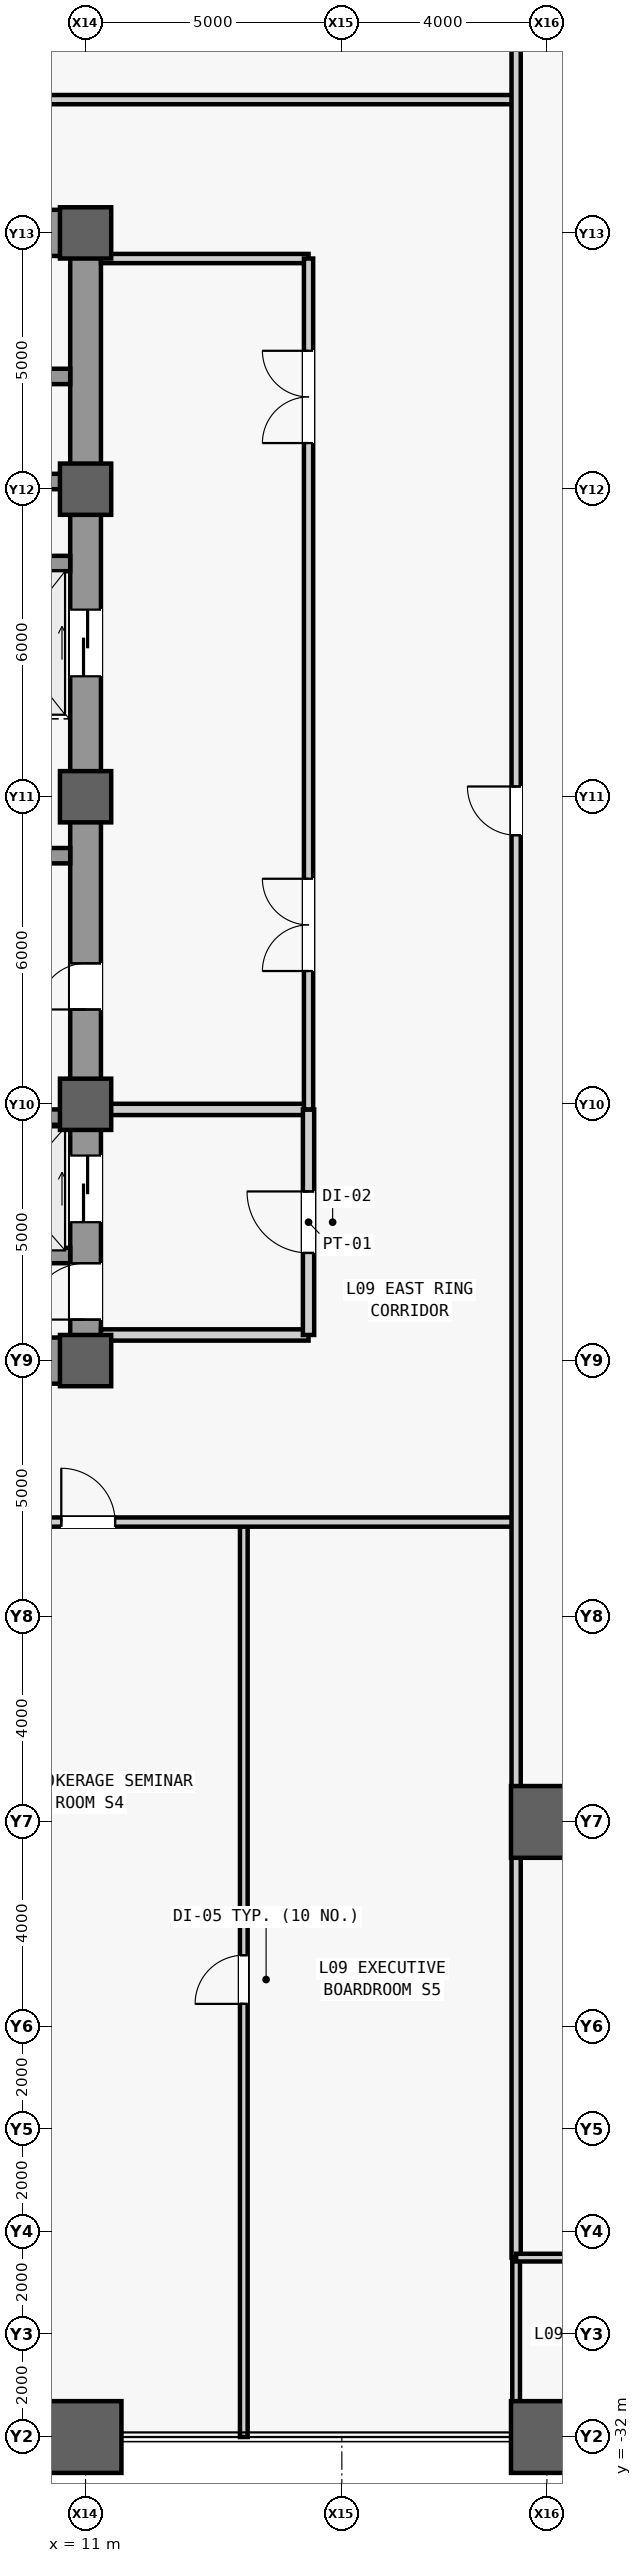
"""IFC4 building model, lengths in metres.
Left out: names, types, materials, properties, quantities, classifications, styles, units other than length and angle.
Written with IfcOpenShell. Run it as: python <this file> out.ifc"""

import sys

from ifc_helpers import new_model, si_unit, direction, frame, frame_2d, origin, origin_2d, place, context, subcontext, project, spatial, rectangle, hollow_rectangle, extrude, source, transform, mapped, element, fill, save


model = new_model("IFC4")
c1 = context("Model", 3, precision=1e-05, world=origin(), true_north=direction((0.0, 1.0)))
c2 = subcontext(c1, "Body", "Model", "MODEL_VIEW")
j1 = project(units=[si_unit("LENGTHUNIT", "METRE"), si_unit("PLANEANGLEUNIT", "RADIAN")], contexts=[c1])
p1 = place(None, origin())
s1 = spatial("IfcSite", under=j1, at=p1, CompositionType="ELEMENT")
p2 = place(p1, origin())
s2 = spatial("IfcBuilding", under=s1, at=p2, CompositionType="ELEMENT")
p3 = place(p2, frame((0.0, 0.0, 45.2)))
s3 = spatial("IfcBuildingStorey", under=s2, at=p3, CompositionType="ELEMENT", Elevation=45.2)
m1 = source(origin(), c2, "Body", "SweptSolid", [
    extrude(rectangle(XDim=22.0, YDim=0.6, at=frame_2d((11.0, 0.0))), origin(), (0.0, 0.0, 1.0), 3.94),
])
p4 = place(p3, frame((11.0, -11.0, 0.0), z_axis=(0.0, 0.0, 1.0), x_axis=(0.0, 1.0, 0.0)))
e1 = element("IfcWall", 1, at=p4, inside=s3, PredefinedType="SHEAR", context=c2, shape_type="MappedRepresentation", body=[
    mapped(m1, transform((0.0, 0.0, 0.0), scale=1.0)),
])
m2 = source(origin(), c2, "Body", "SweptSolid", [
    extrude(rectangle(XDim=1.1, YDim=2.2, at=frame_2d((0.55, 1.1))), frame((0.0, 0.31, 0.0), z_axis=(0.0, -1.0, 0.0), x_axis=(1.0, 0.0, 0.0)), (0.0, 0.0, 1.0), 0.62),
])
p5 = place(p4, frame((0.8, 0.0, 0.0)))
e2 = element("IfcOpeningElement", 2, at=p5, cuts=e1, PredefinedType="OPENING", context=c2, shape_type="MappedRepresentation", body=[
    mapped(m2, transform((0.0, 0.0, 0.0), scale=1.0)),
])
m3 = source(origin(), c2, "Body", "SweptSolid", [
    extrude(rectangle(XDim=0.9, YDim=2.15, at=frame_2d((0.45, 1.075))), frame((0.0, 0.31, 0.0), z_axis=(0.0, -1.0, 0.0), x_axis=(1.0, 0.0, 0.0)), (0.0, 0.0, 1.0), 0.62),
])
p6 = place(p4, frame((6.85, 0.0, 0.0)))
e3 = element("IfcOpeningElement", 3, at=p6, cuts=e1, PredefinedType="OPENING", context=c2, shape_type="MappedRepresentation", body=[
    mapped(m3, transform((0.0, 0.0, 0.0), scale=1.0)),
])
m4 = source(origin(), c2, "Body", "SweptSolid", [
    extrude(rectangle(XDim=1.3, YDim=2.3, at=frame_2d((0.65, 1.15))), frame((0.0, 0.31, 0.0), z_axis=(0.0, -1.0, 0.0), x_axis=(1.0, 0.0, 0.0)), (0.0, 0.0, 1.0), 0.62),
])
p7 = place(p4, frame((2.7, 0.0, 0.0)))
e4 = element("IfcOpeningElement", 4, at=p7, cuts=e1, PredefinedType="OPENING", context=c2, shape_type="MappedRepresentation", body=[
    mapped(m4, transform((0.0, 0.0, 0.0), scale=1.0)),
])
p8 = place(p4, frame((13.35, 0.0, 0.0)))
e5 = element("IfcOpeningElement", 5, at=p8, cuts=e1, PredefinedType="OPENING", context=c2, shape_type="MappedRepresentation", body=[
    mapped(m4, transform((0.0, 0.0, 0.0), scale=1.0)),
])
m5 = source(origin(), c2, "Body", "SweptSolid", [
    extrude(rectangle(XDim=5.85, YDim=0.9, at=frame_2d((2.925, 0.0))), origin(), (0.0, 0.0, 1.0), 3.94),
])
p9 = place(p3, frame((4.85, -11.0, 0.0), z_axis=(0.0, 0.0, 1.0), x_axis=(1.0, 0.0, 0.0)))
e6 = element("IfcWall", 6, at=p9, inside=s3, PredefinedType="SHEAR", context=c2, shape_type="MappedRepresentation", body=[
    mapped(m5, transform((0.0, 0.0, 0.0), scale=1.0)),
])
p10 = place(p3, frame((4.85, 11.0, 0.0), z_axis=(0.0, 0.0, 1.0), x_axis=(1.0, 0.0, 0.0)))
e7 = element("IfcWall", 7, at=p10, inside=s3, PredefinedType="SHEAR", context=c2, shape_type="MappedRepresentation", body=[
    mapped(m5, transform((0.0, 0.0, 0.0), scale=1.0)),
])
m6 = source(origin(), c2, "Body", "SweptSolid", [
    extrude(rectangle(XDim=1.05, YDim=2.2, at=frame_2d((0.525, 1.1))), frame((0.0, 0.46, 0.0), z_axis=(0.0, -1.0, 0.0), x_axis=(1.0, 0.0, 0.0)), (0.0, 0.0, 1.0), 0.92),
])
p11 = place(p10, frame((1.375, 0.0, 0.0)))
e8 = element("IfcOpeningElement", 8, at=p11, cuts=e7, PredefinedType="OPENING", context=c2, shape_type="MappedRepresentation", body=[
    mapped(m6, transform((0.0, 0.0, 0.0), scale=1.0)),
])
m7 = source(origin(), c2, "Body", "SweptSolid", [
    extrude(rectangle(XDim=5.6, YDim=0.3, at=frame_2d((2.8, 0.0))), origin(), (0.0, 0.0, 1.0), 3.94),
])
p12 = place(p3, frame((5.1, -1.15, 0.0), z_axis=(0.0, 0.0, 1.0), x_axis=(1.0, 0.0, 0.0)))
e9 = element("IfcWall", 9, at=p12, inside=s3, PredefinedType="SHEAR", context=c2, shape_type="MappedRepresentation", body=[
    mapped(m7, transform((0.0, 0.0, 0.0), scale=1.0)),
])
m8 = source(origin(), c2, "Body", "SweptSolid", [
    extrude(hollow_rectangle(XDim=1.4, YDim=1.4, WallThickness=0.075, at=origin_2d()), origin(), (0.0, 0.0, 1.0), 4.2),
])
p13 = place(p3, frame((11.0, -32.0, 0.0), z_axis=(0.0, 0.0, 1.0), x_axis=(1.0, 0.0, 0.0)))
e10 = element("IfcColumn", 10, at=p13, inside=s3, PredefinedType="COLUMN", context=c2, shape_type="MappedRepresentation", body=[
    mapped(m8, transform((0.0, 0.0, 0.0), scale=1.0)),
])
m9 = source(origin(), c2, "Body", "SweptSolid", [
    extrude(rectangle(XDim=1.0, YDim=1.0, at=origin_2d()), origin(), (0.0, 0.0, 1.0), 4.2),
])
for number, where, z_axis, x_axis in (
    (11, (11.0, -11.0, 0.0), (0.0, 0.0, 1.0), (1.0, 0.0, 0.0)),
    (12, (11.0, -6.0, 0.0), (0.0, 0.0, 1.0), (1.0, 0.0, 0.0)),
    (13, (11.0, 0.0, 0.0), (0.0, 0.0, 1.0), (1.0, 0.0, 0.0)),
    (14, (11.0, 6.0, 0.0), (0.0, 0.0, 1.0), (1.0, 0.0, 0.0)),
    (15, (11.0, 11.0, 0.0), (0.0, 0.0, 1.0), (1.0, 0.0, 0.0)),
):
    element("IfcColumn", number, at=place(p3, frame(where, z_axis=z_axis, x_axis=x_axis)), inside=s3, PredefinedType="COLUMN", context=c2, shape_type="MappedRepresentation", body=[
        mapped(m9, transform((0.0, 0.0, 0.0), scale=1.0)),
    ])
for number, where, z_axis, x_axis in (
    (16, (20.0, -32.0, 0.0), (0.0, 0.0, 1.0), (1.0, 0.0, 0.0)),
    (17, (20.0, -20.0, 0.0), (0.0, 0.0, 1.0), (1.0, 0.0, 0.0)),
):
    element("IfcColumn", number, at=place(p3, frame(where, z_axis=z_axis, x_axis=x_axis)), inside=s3, PredefinedType="COLUMN", context=c2, shape_type="MappedRepresentation", body=[
        mapped(m8, transform((0.0, 0.0, 0.0), scale=1.0)),
    ])
m10 = source(origin(), c2, "Body", "SweptSolid", [
    extrude(rectangle(XDim=2.2, YDim=0.3, at=frame_2d((1.1, 0.0))), origin(), (0.0, 0.0, 1.0), 3.94),
])
for number, where, z_axis, x_axis in (
    (18, (8.5, -8.95, 0.0), (0.0, 0.0, 1.0), (1.0, 0.0, 0.0)),
    (19, (8.5, -6.25, 0.0), (0.0, 0.0, 1.0), (1.0, 0.0, 0.0)),
):
    element("IfcWall", number, at=place(p3, frame(where, z_axis=z_axis, x_axis=x_axis)), inside=s3, PredefinedType="SHEAR", context=c2, shape_type="MappedRepresentation", body=[
        mapped(m10, transform((0.0, 0.0, 0.0), scale=1.0)),
    ])
m11 = source(origin(), c2, "Body", "SweptSolid", [
    extrude(rectangle(XDim=2.3, YDim=0.3, at=frame_2d((1.15, 0.0))), origin(), (0.0, 0.0, 1.0), 3.94),
])
for number, where, z_axis, x_axis in (
    (20, (8.4, 4.55, 0.0), (0.0, 0.0, 1.0), (1.0, 0.0, 0.0)),
    (21, (8.4, 6.15, 0.0), (0.0, 0.0, 1.0), (1.0, 0.0, 0.0)),
    (22, (8.4, 8.2, 0.0), (0.0, 0.0, 1.0), (1.0, 0.0, 0.0)),
):
    element("IfcWall", number, at=place(p3, frame(where, z_axis=z_axis, x_axis=x_axis)), inside=s3, PredefinedType="SHEAR", context=c2, shape_type="MappedRepresentation", body=[
        mapped(m11, transform((0.0, 0.0, 0.0), scale=1.0)),
    ])
m12 = source(origin(), c2, "Body", "SweptSolid", [
    extrude(rectangle(XDim=4.05, YDim=0.22, at=frame_2d((2.025, 0.0))), origin(), (0.0, 0.0, 1.0), 3.94),
])
p14 = place(p3, frame((11.3, -10.5, 0.0), z_axis=(0.0, 0.0, 1.0), x_axis=(1.0, 0.0, 0.0)))
e23 = element("IfcWall", 23, at=p14, inside=s3, PredefinedType="PARTITIONING", context=c2, shape_type="MappedRepresentation", body=[
    mapped(m12, transform((0.0, 0.0, 0.0), scale=1.0)),
])
m13 = source(origin(), c2, "Body", "SweptSolid", [
    extrude(rectangle(XDim=4.05, YDim=0.22, at=frame_2d((2.025, 0.0))), origin(), (0.0, 0.0, 1.0), 3.085),
])
p15 = place(p3, frame((11.3, -6.1, 0.0), z_axis=(0.0, 0.0, 1.0), x_axis=(1.0, 0.0, 0.0)))
e24 = element("IfcWall", 24, at=p15, inside=s3, PredefinedType="PARTITIONING", context=c2, shape_type="MappedRepresentation", body=[
    mapped(m13, transform((0.0, 0.0, 0.0), scale=1.0)),
])
m14 = source(origin(), c2, "Body", "SweptSolid", [
    extrude(rectangle(XDim=4.4, YDim=0.22, at=frame_2d((2.2, 0.0))), origin(), (0.0, 0.0, 1.0), 3.94),
])
p16 = place(p3, frame((15.35, -10.5, 0.0), z_axis=(0.0, 0.0, 1.0), x_axis=(0.0, 1.0, 0.0)))
e25 = element("IfcWall", 25, at=p16, inside=s3, PredefinedType="PARTITIONING", context=c2, shape_type="MappedRepresentation", body=[
    mapped(m14, transform((0.0, 0.0, 0.0), scale=1.0)),
])
m15 = source(origin(), c2, "Body", "SweptSolid", [
    extrude(rectangle(XDim=1.2, YDim=2.2, at=frame_2d((0.6, 1.1))), frame((0.0, 0.12, 0.0), z_axis=(0.0, -1.0, 0.0), x_axis=(1.0, 0.0, 0.0)), (0.0, 0.0, 1.0), 0.24),
])
p17 = place(p16, frame((1.6, 0.0, 0.0)))
e26 = element("IfcOpeningElement", 26, at=p17, cuts=e25, PredefinedType="OPENING", context=c2, shape_type="MappedRepresentation", body=[
    mapped(m15, transform((0.0, 0.0, 0.0), scale=1.0)),
])
m16 = source(origin(), c2, "Body", "SweptSolid", [
    extrude(rectangle(XDim=4.05, YDim=0.18, at=frame_2d((2.025, 0.0))), origin(), (0.0, 0.0, 1.0), 3.94),
])
p18 = place(p3, frame((11.3, 10.5, 0.0), z_axis=(0.0, 0.0, 1.0), x_axis=(1.0, 0.0, 0.0)))
e27 = element("IfcWall", 27, at=p18, inside=s3, PredefinedType="PARTITIONING", context=c2, shape_type="MappedRepresentation", body=[
    mapped(m16, transform((0.0, 0.0, 0.0), scale=1.0)),
])
m17 = source(origin(), c2, "Body", "SweptSolid", [
    extrude(rectangle(XDim=16.6, YDim=0.18, at=frame_2d((8.3, 0.0))), origin(), (0.0, 0.0, 1.0), 3.94),
])
p19 = place(p3, frame((15.35, -6.1, 0.0), z_axis=(0.0, 0.0, 1.0), x_axis=(0.0, 1.0, 0.0)))
e28 = element("IfcWall", 28, at=p19, inside=s3, PredefinedType="PARTITIONING", context=c2, shape_type="MappedRepresentation", body=[
    mapped(m17, transform((0.0, 0.0, 0.0), scale=1.0)),
])
m18 = source(origin(), c2, "Body", "SweptSolid", [
    extrude(rectangle(XDim=1.8, YDim=2.25, at=frame_2d((0.9, 1.125))), frame((0.0, 0.1, 0.0), z_axis=(0.0, -1.0, 0.0), x_axis=(1.0, 0.0, 0.0)), (0.0, 0.0, 1.0), 0.2),
])
p20 = place(p19, frame((2.7, 0.0, 0.0)))
e29 = element("IfcOpeningElement", 29, at=p20, cuts=e28, PredefinedType="OPENING", context=c2, shape_type="MappedRepresentation", body=[
    mapped(m18, transform((0.0, 0.0, 0.0), scale=1.0)),
])
p21 = place(p19, frame((13.0, 0.0, 0.0)))
e30 = element("IfcOpeningElement", 30, at=p21, cuts=e28, PredefinedType="OPENING", context=c2, shape_type="MappedRepresentation", body=[
    mapped(m18, transform((0.0, 0.0, 0.0), scale=1.0)),
])
m19 = source(origin(), c2, "Body", "SweptSolid", [
    extrude(rectangle(XDim=17.85, YDim=0.15, at=frame_2d((8.925, 0.0))), origin(), (0.0, 0.0, 1.0), 3.94),
])
p22 = place(p3, frame((14.087, -32.0, 0.0), z_axis=(0.0, 0.0, 1.0), x_axis=(0.0, 1.0, 0.0)))
e31 = element("IfcWall", 31, at=p22, inside=s3, PredefinedType="PARTITIONING", context=c2, shape_type="MappedRepresentation", body=[
    mapped(m19, transform((0.0, 0.0, 0.0), scale=1.0)),
])
m20 = source(origin(), c2, "Body", "SweptSolid", [
    extrude(rectangle(XDim=0.95, YDim=2.15, at=frame_2d((0.475, 1.075))), frame((0.0, 0.085, 0.0), z_axis=(0.0, -1.0, 0.0), x_axis=(1.0, 0.0, 0.0)), (0.0, 0.0, 1.0), 0.17),
])
p23 = place(p22, frame((8.45, 0.0, 0.0)))
e32 = element("IfcOpeningElement", 32, at=p23, cuts=e31, PredefinedType="OPENING", context=c2, shape_type="MappedRepresentation", body=[
    mapped(m20, transform((0.0, 0.0, 0.0), scale=1.0)),
])
m21 = source(origin(), c2, "Body", "SweptSolid", [
    extrude(rectangle(XDim=37.95, YDim=0.18, at=frame_2d((18.975, 0.0))), origin(), (0.0, 0.0, 1.0), 3.94),
])
p24 = place(p3, frame((-18.55, -14.15, 0.0), z_axis=(0.0, 0.0, 1.0), x_axis=(1.0, 0.0, 0.0)))
e33 = element("IfcWall", 33, at=p24, inside=s3, PredefinedType="PARTITIONING", context=c2, shape_type="MappedRepresentation", body=[
    mapped(m21, transform((0.0, 0.0, 0.0), scale=1.0)),
])
m22 = source(origin(), c2, "Body", "SweptSolid", [
    extrude(rectangle(XDim=1.05, YDim=2.2, at=frame_2d((0.525, 1.1))), frame((0.0, 0.1, 0.0), z_axis=(0.0, -1.0, 0.0), x_axis=(1.0, 0.0, 0.0)), (0.0, 0.0, 1.0), 0.2),
])
p25 = place(p24, frame((5.345, 0.0, 0.0)))
e34 = element("IfcOpeningElement", 34, at=p25, cuts=e33, PredefinedType="OPENING", context=c2, shape_type="MappedRepresentation", body=[
    mapped(m22, transform((0.0, 0.0, 0.0), scale=1.0)),
])
p26 = place(p24, frame((11.809, 0.0, 0.0)))
e35 = element("IfcOpeningElement", 35, at=p26, cuts=e33, PredefinedType="OPENING", context=c2, shape_type="MappedRepresentation", body=[
    mapped(m22, transform((0.0, 0.0, 0.0), scale=1.0)),
])
p27 = place(p24, frame((21.296, 0.0, 0.0)))
e36 = element("IfcOpeningElement", 36, at=p27, cuts=e33, PredefinedType="OPENING", context=c2, shape_type="MappedRepresentation", body=[
    mapped(m22, transform((0.0, 0.0, 0.0), scale=1.0)),
])
p28 = place(p24, frame((29.076, 0.0, 0.0)))
e37 = element("IfcOpeningElement", 37, at=p28, cuts=e33, PredefinedType="OPENING", context=c2, shape_type="MappedRepresentation", body=[
    mapped(m22, transform((0.0, 0.0, 0.0), scale=1.0)),
])
p29 = place(p3, frame((-18.55, 13.6, 0.0), z_axis=(0.0, 0.0, 1.0), x_axis=(1.0, 0.0, 0.0)))
e38 = element("IfcWall", 38, at=p29, inside=s3, PredefinedType="PARTITIONING", context=c2, shape_type="MappedRepresentation", body=[
    mapped(m21, transform((0.0, 0.0, 0.0), scale=1.0)),
])
p30 = place(p29, frame((18.025, 0.0, 0.0)))
e39 = element("IfcOpeningElement", 39, at=p30, cuts=e38, PredefinedType="OPENING", context=c2, shape_type="MappedRepresentation", body=[
    mapped(m22, transform((0.0, 0.0, 0.0), scale=1.0)),
])
m23 = source(origin(), c2, "Body", "SweptSolid", [
    extrude(rectangle(XDim=3.5, YDim=0.15, at=frame_2d((1.75, 0.0))), origin(), (0.0, 0.0, 1.0), 3.94),
])
p31 = place(p3, frame((19.4, -32.0, 0.0), z_axis=(0.0, 0.0, 1.0), x_axis=(0.0, 1.0, 0.0)))
e40 = element("IfcWall", 40, at=p31, inside=s3, PredefinedType="PARTITIONING", context=c2, shape_type="MappedRepresentation", body=[
    mapped(m23, transform((0.0, 0.0, 0.0), scale=1.0)),
])
m24 = source(origin(), c2, "Body", "SweptSolid", [
    extrude(rectangle(XDim=57.0, YDim=0.18, at=frame_2d((28.5, 0.0))), origin(), (0.0, 0.0, 1.0), 3.471),
])
p32 = place(p3, frame((19.4, -28.5, 0.0), z_axis=(0.0, 0.0, 1.0), x_axis=(0.0, 1.0, 0.0)))
e41 = element("IfcWall", 41, at=p32, inside=s3, PredefinedType="PARTITIONING", context=c2, shape_type="MappedRepresentation", body=[
    mapped(m24, transform((0.0, 0.0, 0.0), scale=1.0)),
])
m25 = source(origin(), c2, "Body", "SweptSolid", [
    extrude(rectangle(XDim=0.95, YDim=2.15, at=frame_2d((0.475, 1.075))), frame((0.0, 0.1, 0.0), z_axis=(0.0, -1.0, 0.0), x_axis=(1.0, 0.0, 0.0)), (0.0, 0.0, 1.0), 0.2),
])
p33 = place(p32, frame((27.75, 0.0, 0.0)))
e42 = element("IfcOpeningElement", 42, at=p33, cuts=e41, PredefinedType="OPENING", context=c2, shape_type="MappedRepresentation", body=[
    mapped(m25, transform((0.0, 0.0, 0.0), scale=1.0)),
])
m26 = source(origin(), c2, "Body", "SweptSolid", [
    extrude(rectangle(XDim=9.1, YDim=0.15, at=frame_2d((4.55, 0.0))), origin(), (0.0, 0.0, 1.0), 3.94),
])
p34 = place(p3, frame((19.4, -28.5, 0.0), z_axis=(0.0, 0.0, 1.0), x_axis=(1.0, 0.0, 0.0)))
e43 = element("IfcWall", 43, at=p34, inside=s3, PredefinedType="PARTITIONING", context=c2, shape_type="MappedRepresentation", body=[
    mapped(m26, transform((0.0, 0.0, 0.0), scale=1.0)),
])
p35 = place(p34, frame((4.075, 0.0, 0.0)))
e44 = element("IfcOpeningElement", 44, at=p35, cuts=e43, PredefinedType="OPENING", context=c2, shape_type="MappedRepresentation", body=[
    mapped(m20, transform((0.0, 0.0, 0.0), scale=1.0)),
])
m27 = source(origin(), c2, "Body", "SweptSolid", [
    extrude(rectangle(XDim=1.1, YDim=2.2, at=frame_2d((0.55, 1.1))), frame((0.0, 0.025, 0.0), z_axis=(0.0, -1.0, 0.0), x_axis=(1.0, 0.0, 0.0)), (0.0, 0.0, 1.0), 0.05),
])
p36 = place(p5, origin())
e45 = element("IfcDoor", 45, at=p36, inside=s3, OperationType="SINGLE_SWING_LEFT", PredefinedType="DOOR", context=c2, shape_type="MappedRepresentation", body=[
    mapped(m27, transform((0.0, 0.0, 0.0), scale=1.0)),
])
fill(e2, e45)
m28 = source(origin(), c2, "Body", "SweptSolid", [
    extrude(rectangle(XDim=0.9, YDim=2.15, at=frame_2d((0.45, 1.075))), frame((0.0, 0.025, 0.0), z_axis=(0.0, -1.0, 0.0), x_axis=(1.0, 0.0, 0.0)), (0.0, 0.0, 1.0), 0.05),
])
p37 = place(p6, origin())
e46 = element("IfcDoor", 46, at=p37, inside=s3, OperationType="SINGLE_SWING_LEFT", PredefinedType="DOOR", context=c2, shape_type="MappedRepresentation", body=[
    mapped(m28, transform((0.0, 0.0, 0.0), scale=1.0)),
])
fill(e3, e46)
m29 = source(origin(), c2, "Body", "SweptSolid", [
    extrude(rectangle(XDim=1.2, YDim=2.2, at=frame_2d((0.6, 1.1))), frame((0.0, 0.025, 0.0), z_axis=(0.0, -1.0, 0.0), x_axis=(1.0, 0.0, 0.0)), (0.0, 0.0, 1.0), 0.05),
])
p38 = place(p17, origin())
e47 = element("IfcDoor", 47, at=p38, inside=s3, OperationType="SINGLE_SWING_RIGHT", PredefinedType="DOOR", context=c2, shape_type="MappedRepresentation", body=[
    mapped(m29, transform((0.0, 0.0, 0.0), scale=1.0)),
])
fill(e26, e47)
m30 = source(origin(), c2, "Body", "SweptSolid", [
    extrude(rectangle(XDim=1.8, YDim=2.25, at=frame_2d((0.9, 1.125))), frame((0.0, 0.025, 0.0), z_axis=(0.0, -1.0, 0.0), x_axis=(1.0, 0.0, 0.0)), (0.0, 0.0, 1.0), 0.05),
])
p39 = place(p20, origin())
e48 = element("IfcDoor", 48, at=p39, inside=s3, OperationType="SINGLE_SWING_RIGHT", PredefinedType="DOOR", context=c2, shape_type="MappedRepresentation", body=[
    mapped(m30, transform((0.0, 0.0, 0.0), scale=1.0)),
])
fill(e29, e48)
p40 = place(p21, origin())
e49 = element("IfcDoor", 49, at=p40, inside=s3, OperationType="SINGLE_SWING_LEFT", PredefinedType="DOOR", context=c2, shape_type="MappedRepresentation", body=[
    mapped(m30, transform((0.0, 0.0, 0.0), scale=1.0)),
])
fill(e30, e49)
m31 = source(origin(), c2, "Body", "SweptSolid", [
    extrude(rectangle(XDim=0.95, YDim=2.15, at=frame_2d((0.475, 1.075))), frame((0.0, 0.025, 0.0), z_axis=(0.0, -1.0, 0.0), x_axis=(1.0, 0.0, 0.0)), (0.0, 0.0, 1.0), 0.05),
])
p41 = place(p23, origin())
e50 = element("IfcDoor", 50, at=p41, inside=s3, OperationType="SINGLE_SWING_LEFT", PredefinedType="DOOR", context=c2, shape_type="MappedRepresentation", body=[
    mapped(m31, transform((0.0, 0.0, 0.0), scale=1.0)),
])
fill(e32, e50)
m32 = source(origin(), c2, "Body", "SweptSolid", [
    extrude(rectangle(XDim=1.05, YDim=2.2, at=frame_2d((0.525, 1.1))), frame((0.0, 0.025, 0.0), z_axis=(0.0, -1.0, 0.0), x_axis=(1.0, 0.0, 0.0)), (0.0, 0.0, 1.0), 0.05),
])
p42 = place(p28, origin())
e51 = element("IfcDoor", 51, at=p42, inside=s3, OperationType="SINGLE_SWING_LEFT", PredefinedType="DOOR", context=c2, shape_type="MappedRepresentation", body=[
    mapped(m32, transform((0.0, 0.0, 0.0), scale=1.0)),
])
fill(e37, e51)
p43 = place(p33, origin())
e52 = element("IfcDoor", 52, at=p43, inside=s3, OperationType="SINGLE_SWING_RIGHT", PredefinedType="DOOR", context=c2, shape_type="MappedRepresentation", body=[
    mapped(m31, transform((0.0, 0.0, 0.0), scale=1.0)),
])
fill(e42, e52)
m33 = source(origin(), c2, "Body", "SweptSolid", [
    extrude(rectangle(XDim=1.3, YDim=2.3, at=frame_2d((0.65, 1.15))), frame((0.0, 0.025, 0.0), z_axis=(0.0, -1.0, 0.0), x_axis=(1.0, 0.0, 0.0)), (0.0, 0.0, 1.0), 0.05),
])
p44 = place(p7, origin())
e53 = element("IfcDoor", 53, at=p44, inside=s3, OperationType="SLIDING_TO_LEFT", PredefinedType="DOOR", context=c2, shape_type="MappedRepresentation", body=[
    mapped(m33, transform((0.0, 0.0, 0.0), scale=1.0)),
])
fill(e4, e53)
p45 = place(p8, origin())
e54 = element("IfcDoor", 54, at=p45, inside=s3, OperationType="SLIDING_TO_LEFT", PredefinedType="DOOR", context=c2, shape_type="MappedRepresentation", body=[
    mapped(m33, transform((0.0, 0.0, 0.0), scale=1.0)),
])
fill(e5, e54)
save(model, sys.argv[1])
